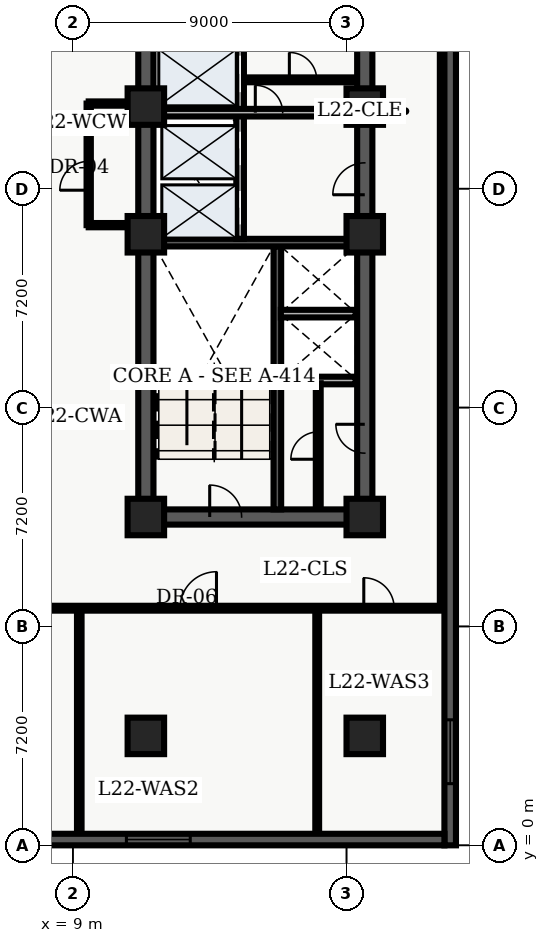
"""IFC4 building model, lengths in metres.
Left out: names, types, materials, properties, quantities, classifications, styles, units other than length and angle.
Written with IfcOpenShell. Run it as: python <this file> out.ifc"""

import sys

from ifc_helpers import new_model, entity, si_unit, converted_unit, direction, frame, origin_with_axes, origin_2d_with_axis, place, context, subcontext, project, spatial, polyline, rectangle, outline, extrude, element, fill, save


model = new_model("IFC4")
c1 = context("Model", 3, precision=1e-05, world=origin_with_axes(), true_north=direction((0.0, 1.0)))
c2 = subcontext(c1, "Body", "Model", "MODEL_VIEW")
j1 = project(units=[si_unit("LENGTHUNIT", "METRE"), converted_unit("PLANEANGLEUNIT", "DEGREE", entity("IfcPlaneAngleMeasure", 0.017), si_unit("PLANEANGLEUNIT", "RADIAN"), dimensions=[0, 0, 0, 0, 0, 0, 0])], contexts=[c1])
p1 = place(None, origin_with_axes())
s1 = spatial("IfcSite", under=j1, at=p1, CompositionType="ELEMENT")
p2 = place(p1, origin_with_axes())
s2 = spatial("IfcBuilding", under=s1, at=p2, CompositionType="ELEMENT")
p3 = place(p2, frame((0.0, 0.0, 93.0), z_axis=(0.0, 0.0, 1.0), x_axis=(1.0, 0.0, 0.0)))
s3 = spatial("IfcBuildingStorey", under=s2, at=p3, CompositionType="ELEMENT", Elevation=93.0)
p4 = place(p3, frame((11.4, 10.8, 0.0), z_axis=(0.0, 0.0, 1.0), x_axis=(0.0, 1.0, 0.0)))
e1 = element("IfcWall", 1, at=p4, inside=s3, PredefinedType="SHEAR", context=c2, shape_type="SweptSolid", body=[
    extrude(outline(polyline([(0.0, -0.25), (27.0, -0.25), (27.0, 0.25), (0.0, 0.25), (0.0, -0.25)])), origin_with_axes(), (0.0, 0.0, 1.0), 3.66),
])
p5 = place(p3, frame((11.4, 10.8, 0.0), z_axis=(0.0, 0.0, 1.0), x_axis=(1.0, 0.0, 0.0)))
e2 = element("IfcWall", 2, at=p5, inside=s3, PredefinedType="SHEAR", context=c2, shape_type="SweptSolid", body=[
    extrude(outline(polyline([(0.0, -0.25), (7.2, -0.25), (7.2, 0.25), (0.0, 0.25), (0.0, -0.25)])), origin_with_axes(), (0.0, 0.0, 1.0), 3.66),
])
p6 = place(p5, frame((2.625, 0.0, 0.0), z_axis=(0.0, 0.0, 1.0), x_axis=(1.0, 0.0, 0.0)))
e3 = element("IfcOpeningElement", 3, at=p6, cuts=e2, PredefinedType="OPENING", context=c2, shape_type="SweptSolid", body=[
    extrude(rectangle(XDim=1.05, YDim=0.52, at=origin_2d_with_axis()), origin_with_axes(), (0.0, 0.0, 1.0), 2.15),
])
p7 = place(p3, frame((18.6, 10.8, 0.0), z_axis=(0.0, 0.0, 1.0), x_axis=(0.0, 1.0, 0.0)))
e4 = element("IfcWall", 4, at=p7, inside=s3, PredefinedType="SHEAR", context=c2, shape_type="SweptSolid", body=[
    extrude(outline(polyline([(0.0, -0.25), (13.5, -0.25), (13.5, 0.25), (0.0, 0.25), (0.0, -0.25)])), origin_with_axes(), (0.0, 0.0, 1.0), 3.66),
])
p8 = place(p7, frame((11.125, 0.0, 0.0), z_axis=(0.0, 0.0, 1.0), x_axis=(1.0, 0.0, 0.0)))
e5 = element("IfcOpeningElement", 5, at=p8, cuts=e4, PredefinedType="OPENING", context=c2, shape_type="SweptSolid", body=[
    extrude(rectangle(XDim=1.05, YDim=0.52, at=origin_2d_with_axis()), origin_with_axes(), (0.0, 0.0, 1.0), 2.15),
])
p9 = place(p7, frame((2.575, 0.0, 0.0), z_axis=(0.0, 0.0, 1.0), x_axis=(1.0, 0.0, 0.0)))
e6 = element("IfcOpeningElement", 6, at=p9, cuts=e4, PredefinedType="OPENING", context=c2, shape_type="SweptSolid", body=[
    extrude(rectangle(XDim=0.95, YDim=0.52, at=origin_2d_with_axis()), origin_with_axes(), (0.0, 0.0, 1.0), 2.15),
])
p10 = place(p3, frame((18.6, 24.3, 0.0), z_axis=(0.0, 0.0, 1.0), x_axis=(0.0, 1.0, 0.0)))
e7 = element("IfcWall", 7, at=p10, inside=s3, PredefinedType="SHEAR", context=c2, shape_type="SweptSolid", body=[
    extrude(outline(polyline([(0.0, -0.25), (13.5, -0.25), (13.5, 0.25), (0.0, 0.25), (0.0, -0.25)])), origin_with_axes(), (0.0, 0.0, 1.0), 3.66),
])
p11 = place(p10, frame((6.025, 0.0, 0.0), z_axis=(0.0, 0.0, 1.0), x_axis=(1.0, 0.0, 0.0)))
e8 = element("IfcOpeningElement", 8, at=p11, cuts=e7, PredefinedType="OPENING", context=c2, shape_type="SweptSolid", body=[
    extrude(rectangle(XDim=0.95, YDim=0.52, at=origin_2d_with_axis()), origin_with_axes(), (0.0, 0.0, 1.0), 2.15),
])
p12 = place(p10, frame((7.825, 0.0, 0.0), z_axis=(0.0, 0.0, 1.0), x_axis=(1.0, 0.0, 0.0)))
e9 = element("IfcOpeningElement", 9, at=p12, cuts=e7, PredefinedType="OPENING", context=c2, shape_type="SweptSolid", body=[
    extrude(rectangle(XDim=0.95, YDim=0.52, at=origin_2d_with_axis()), origin_with_axes(), (0.0, 0.0, 1.0), 2.15),
])
p13 = place(p3, frame((15.725, 11.05, 0.0), z_axis=(0.0, 0.0, 1.0), x_axis=(0.0, 1.0, 0.0)))
e10 = element("IfcWall", 10, at=p13, inside=s3, PredefinedType="SHEAR", context=c2, shape_type="SweptSolid", body=[
    extrude(outline(polyline([(0.0, -0.125), (8.65, -0.125), (8.65, 0.125), (0.0, 0.125), (0.0, -0.125)])), origin_with_axes(), (0.0, 0.0, 1.0), 3.66),
])
p14 = place(p3, frame((11.65, 19.825, 0.0), z_axis=(0.0, 0.0, 1.0), x_axis=(1.0, 0.0, 0.0)))
e11 = element("IfcWall", 11, at=p14, inside=s3, PredefinedType="SHEAR", context=c2, shape_type="SweptSolid", body=[
    extrude(outline(polyline([(0.0, -0.125), (6.7, -0.125), (6.7, 0.125), (0.0, 0.125), (0.0, -0.125)])), origin_with_axes(), (0.0, 0.0, 1.0), 3.66),
])
p15 = place(p3, frame((14.5, 19.95, 0.0), z_axis=(0.0, 0.0, 1.0), x_axis=(0.0, 1.0, 0.0)))
e12 = element("IfcWall", 12, at=p15, inside=s3, PredefinedType="SOLIDWALL", context=c2, shape_type="SweptSolid", body=[
    extrude(outline(polyline([(0.0, -0.125), (6.25, -0.125), (6.25, 0.125), (0.0, 0.125), (0.0, -0.125)])), origin_with_axes(), (0.0, 0.0, 1.0), 2.7),
])
p16 = place(p15, frame((1.025, 0.0, 0.0), z_axis=(0.0, 0.0, 1.0), x_axis=(1.0, 0.0, 0.0)))
e13 = element("IfcOpeningElement", 13, at=p16, cuts=e12, PredefinedType="OPENING", context=c2, shape_type="SweptSolid", body=[
    extrude(rectangle(XDim=1.1, YDim=0.27, at=origin_2d_with_axis()), origin_with_axes(), (0.0, 0.0, 1.0), 2.15),
])
p17 = place(p15, frame((2.975, 0.0, 0.0), z_axis=(0.0, 0.0, 1.0), x_axis=(1.0, 0.0, 0.0)))
e14 = element("IfcOpeningElement", 14, at=p17, cuts=e12, PredefinedType="OPENING", context=c2, shape_type="SweptSolid", body=[
    extrude(rectangle(XDim=1.1, YDim=0.27, at=origin_2d_with_axis()), origin_with_axes(), (0.0, 0.0, 1.0), 2.15),
])
p18 = place(p15, frame((5.425, 0.0, 0.0), z_axis=(0.0, 0.0, 1.0), x_axis=(1.0, 0.0, 0.0)))
e15 = element("IfcOpeningElement", 15, at=p18, cuts=e12, PredefinedType="OPENING", context=c2, shape_type="SweptSolid", body=[
    extrude(rectangle(XDim=1.2, YDim=0.27, at=origin_2d_with_axis()), origin_with_axes(), (0.0, 0.0, 1.0), 2.15),
])
p19 = place(p3, frame((11.7, 24.1, 0.0), z_axis=(0.0, 0.0, 1.0), x_axis=(1.0, 0.0, 0.0)))
e16 = element("IfcWall", 16, at=p19, inside=s3, PredefinedType="SOLIDWALL", context=c2, shape_type="SweptSolid", body=[
    extrude(outline(polyline([(0.0, -0.125), (6.6, -0.125), (6.6, 0.125), (0.0, 0.125), (0.0, -0.125)])), origin_with_axes(), (0.0, 0.0, 1.0), 2.7),
])
p20 = place(p19, frame((3.75, 0.0, 0.0), z_axis=(0.0, 0.0, 1.0), x_axis=(1.0, 0.0, 0.0)))
e17 = element("IfcOpeningElement", 17, at=p20, cuts=e16, PredefinedType="OPENING", context=c2, shape_type="SweptSolid", body=[
    extrude(rectangle(XDim=0.9, YDim=0.27, at=origin_2d_with_axis()), origin_with_axes(), (0.0, 0.0, 1.0), 2.15),
])
for number, where, z_axis, x_axis in (
    (18, (11.4, 3.6, 0.0), (0.0, 0.0, 1.0), (1.0, 0.0, 0.0)),
    (19, (11.4, 10.8, 0.0), (0.0, 0.0, 1.0), (1.0, 0.0, 0.0)),
    (20, (11.4, 20.1, 0.0), (0.0, 0.0, 1.0), (1.0, 0.0, 0.0)),
    (21, (11.4, 24.3, 0.0), (0.0, 0.0, 1.0), (1.0, 0.0, 0.0)),
    (22, (18.6, 3.6, 0.0), (0.0, 0.0, 1.0), (1.0, 0.0, 0.0)),
    (23, (18.6, 10.8, 0.0), (0.0, 0.0, 1.0), (1.0, 0.0, 0.0)),
    (24, (18.6, 20.1, 0.0), (0.0, 0.0, 1.0), (1.0, 0.0, 0.0)),
    (25, (18.6, 24.3, 0.0), (0.0, 0.0, 1.0), (1.0, 0.0, 0.0)),
):
    element("IfcColumn", number, at=place(p3, frame(where, z_axis=z_axis, x_axis=x_axis)), inside=s3, PredefinedType="COLUMN", context=c2, shape_type="SweptSolid", body=[
        extrude(rectangle(XDim=1.2, YDim=1.2, at=origin_2d_with_axis()), origin_with_axes(), (0.0, 0.0, 1.0), 3.9),
    ])
p21 = place(p3, frame((14.62, 25.18, 0.0), z_axis=(0.0, 0.0, 1.0), x_axis=(1.0, 0.0, 0.0)))
e26 = element("IfcWall", 26, at=p21, inside=s3, PredefinedType="PARTITIONING", context=c2, shape_type="SweptSolid", body=[
    extrude(outline(polyline([(0.0, -0.08), (3.68, -0.08), (3.68, 0.08), (0.0, 0.08), (0.0, -0.08)])), origin_with_axes(), (0.0, 0.0, 1.0), 2.7),
])
p22 = place(p21, frame((1.95, 0.0, 0.0), z_axis=(0.0, 0.0, 1.0), x_axis=(1.0, 0.0, 0.0)))
e27 = element("IfcOpeningElement", 27, at=p22, cuts=e26, PredefinedType="OPENING", context=c2, shape_type="SweptSolid", body=[
    extrude(rectangle(XDim=0.9, YDim=0.18, at=origin_2d_with_axis()), origin_with_axes(), (0.0, 0.0, 1.0), 2.15),
])
for number, where, z_axis, x_axis in (
    (28, (15.84, 15.29, 0.0), (0.0, 0.0, 1.0), (1.0, 0.0, 0.0)),
    (29, (15.84, 17.49, 0.0), (0.0, 0.0, 1.0), (1.0, 0.0, 0.0)),
):
    element("IfcWall", number, at=place(p3, frame(where, z_axis=z_axis, x_axis=x_axis)), inside=s3, PredefinedType="SOLIDWALL", context=c2, shape_type="SweptSolid", body=[
        extrude(outline(polyline([(0.0, -0.125), (2.46, -0.125), (2.46, 0.125), (0.0, 0.125), (0.0, -0.125)])), origin_with_axes(), (0.0, 0.0, 1.0), 2.7),
    ])
p23 = place(p3, frame((17.07, 11.1, 0.0), z_axis=(0.0, 0.0, 1.0), x_axis=(0.0, 1.0, 0.0)))
e30 = element("IfcWall", 30, at=p23, inside=s3, PredefinedType="PARTITIONING", context=c2, shape_type="SweptSolid", body=[
    extrude(outline(polyline([(0.0, -0.08), (4.1, -0.08), (4.1, 0.08), (0.0, 0.08), (0.0, -0.08)])), origin_with_axes(), (0.0, 0.0, 1.0), 2.7),
])
p24 = place(p23, frame((2.05, 0.0, 0.0), z_axis=(0.0, 0.0, 1.0), x_axis=(1.0, 0.0, 0.0)))
e31 = element("IfcOpeningElement", 31, at=p24, cuts=e30, PredefinedType="OPENING", context=c2, shape_type="SweptSolid", body=[
    extrude(rectangle(XDim=0.9, YDim=0.18, at=origin_2d_with_axis()), origin_with_axes(), (0.0, 0.0, 1.0), 2.15),
])
p25 = place(p3, frame((9.52, 20.4, 0.0), z_axis=(0.0, 0.0, 1.0), x_axis=(0.0, 1.0, 0.0)))
e32 = element("IfcWall", 32, at=p25, inside=s3, PredefinedType="PARTITIONING", context=c2, shape_type="SweptSolid", body=[
    extrude(outline(polyline([(0.0, -0.07), (4.0, -0.07), (4.0, 0.07), (0.0, 0.07), (0.0, -0.07)])), origin_with_axes(), (0.0, 0.0, 1.0), 2.7),
])
p26 = place(p25, frame((1.625, 0.0, 0.0), z_axis=(0.0, 0.0, 1.0), x_axis=(1.0, 0.0, 0.0)))
e33 = element("IfcOpeningElement", 33, at=p26, cuts=e32, PredefinedType="OPENING", context=c2, shape_type="SweptSolid", body=[
    extrude(rectangle(XDim=0.95, YDim=0.16, at=origin_2d_with_axis()), origin_with_axes(), (0.0, 0.0, 1.0), 2.15),
])
for number, where, z_axis, x_axis in (
    (34, (9.52, 20.4, 0.0), (0.0, 0.0, 1.0), (1.0, 0.0, 0.0)),
    (35, (9.52, 24.4, 0.0), (0.0, 0.0, 1.0), (1.0, 0.0, 0.0)),
):
    element("IfcWall", number, at=place(p3, frame(where, z_axis=z_axis, x_axis=x_axis)), inside=s3, PredefinedType="PARTITIONING", context=c2, shape_type="SweptSolid", body=[
        extrude(outline(polyline([(0.0, -0.07), (1.58, -0.07), (1.58, 0.07), (0.0, 0.07), (0.0, -0.07)])), origin_with_axes(), (0.0, 0.0, 1.0), 2.7),
    ])
p27 = place(p3, frame((2.6, 7.8, 0.0), z_axis=(0.0, 0.0, 1.0), x_axis=(1.0, 0.0, 0.0)))
e36 = element("IfcWall", 36, at=p27, inside=s3, PredefinedType="PARTITIONING", context=c2, shape_type="SweptSolid", body=[
    extrude(outline(polyline([(0.0, -0.08), (18.625, -0.08), (18.625, 0.08), (0.0, 0.08), (0.0, -0.08)])), origin_with_axes(), (0.0, 0.0, 1.0), 2.7),
])
p28 = place(p27, frame((2.42, 0.0, 0.0), z_axis=(0.0, 0.0, 1.0), x_axis=(1.0, 0.0, 0.0)))
e37 = element("IfcOpeningElement", 37, at=p28, cuts=e36, PredefinedType="OPENING", context=c2, shape_type="SweptSolid", body=[
    extrude(rectangle(XDim=1.0, YDim=0.18, at=origin_2d_with_axis()), origin_with_axes(), (0.0, 0.0, 1.0), 2.15),
])
p29 = place(p27, frame((10.523, 0.0, 0.0), z_axis=(0.0, 0.0, 1.0), x_axis=(1.0, 0.0, 0.0)))
e38 = element("IfcOpeningElement", 38, at=p29, cuts=e36, PredefinedType="OPENING", context=c2, shape_type="SweptSolid", body=[
    extrude(rectangle(XDim=1.2, YDim=0.18, at=origin_2d_with_axis()), origin_with_axes(), (0.0, 0.0, 1.0), 2.2),
])
p30 = place(p27, frame((16.468, 0.0, 0.0), z_axis=(0.0, 0.0, 1.0), x_axis=(1.0, 0.0, 0.0)))
e39 = element("IfcOpeningElement", 39, at=p30, cuts=e36, PredefinedType="OPENING", context=c2, shape_type="SweptSolid", body=[
    extrude(rectangle(XDim=1.0, YDim=0.18, at=origin_2d_with_axis()), origin_with_axes(), (0.0, 0.0, 1.0), 2.15),
])
p31 = place(p3, frame((21.15, 7.8, 0.0), z_axis=(0.0, 0.0, 1.0), x_axis=(0.0, 1.0, 0.0)))
e40 = element("IfcWall", 40, at=p31, inside=s3, PredefinedType="PARTITIONING", context=c2, shape_type="SweptSolid", body=[
    extrude(outline(polyline([(0.0, -0.08), (32.7, -0.08), (32.7, 0.08), (0.0, 0.08), (0.0, -0.08)])), origin_with_axes(), (0.0, 0.0, 1.0), 2.7),
])
p32 = place(p3, frame((9.21, 0.36, 0.0), z_axis=(0.0, 0.0, 1.0), x_axis=(0.0, 1.0, 0.0)))
e41 = element("IfcWall", 41, at=p32, inside=s3, PredefinedType="PARTITIONING", context=c2, shape_type="SweptSolid", body=[
    extrude(outline(polyline([(0.0, -0.075), (7.34, -0.075), (7.34, 0.075), (0.0, 0.075), (0.0, -0.075)])), origin_with_axes(), (0.0, 0.0, 1.0), 2.7),
])
p33 = place(p3, frame((17.036, 0.36, 0.0), z_axis=(0.0, 0.0, 1.0), x_axis=(0.0, 1.0, 0.0)))
e42 = element("IfcWall", 42, at=p33, inside=s3, PredefinedType="PARTITIONING", context=c2, shape_type="SweptSolid", body=[
    extrude(outline(polyline([(0.0, -0.062), (7.34, -0.062), (7.34, 0.062), (0.0, 0.062), (0.0, -0.062)])), origin_with_axes(), (0.0, 0.0, 1.0), 2.7),
])
p34 = place(p3, frame((21.41, 45.82, 0.0), z_axis=(0.0, 0.0, 1.0), x_axis=(0.0, -1.0, 0.0)))
e43 = element("IfcWall", 43, at=p34, inside=s3, PredefinedType="SOLIDWALL", context=c2, shape_type="SweptSolid", body=[
    extrude(outline(polyline([(0.0, -0.19), (45.82, -0.19), (45.82, 0.19), (0.0, 0.19), (0.0, -0.19)])), origin_with_axes(), (0.0, 0.0, 1.0), 3.66),
])
p35 = place(p34, frame((3.079, 0.0, 0.45), z_axis=(0.0, 0.0, 1.0), x_axis=(1.0, 0.0, 0.0)))
e44 = element("IfcOpeningElement", 44, at=p35, cuts=e43, PredefinedType="OPENING", context=c2, shape_type="SweptSolid", body=[
    extrude(rectangle(XDim=2.1, YDim=0.4, at=origin_2d_with_axis()), origin_with_axes(), (0.0, 0.0, 1.0), 2.2),
])
p36 = place(p34, frame((42.741, 0.0, 0.45), z_axis=(0.0, 0.0, 1.0), x_axis=(1.0, 0.0, 0.0)))
e45 = element("IfcOpeningElement", 45, at=p36, cuts=e43, PredefinedType="OPENING", context=c2, shape_type="SweptSolid", body=[
    extrude(rectangle(XDim=2.1, YDim=0.4, at=origin_2d_with_axis()), origin_with_axes(), (0.0, 0.0, 1.0), 2.2),
])
p37 = place(p3, frame((21.22, 0.19, 0.0), z_axis=(0.0, 0.0, 1.0), x_axis=(-1.0, 0.0, 0.0)))
e46 = element("IfcWall", 46, at=p37, inside=s3, PredefinedType="SOLIDWALL", context=c2, shape_type="SweptSolid", body=[
    extrude(outline(polyline([(0.0, -0.19), (18.82, -0.19), (18.82, 0.19), (0.0, 0.19), (0.0, -0.19)])), origin_with_axes(), (0.0, 0.0, 1.0), 3.66),
])
p38 = place(p37, frame((9.41, 0.0, 0.45), z_axis=(0.0, 0.0, 1.0), x_axis=(1.0, 0.0, 0.0)))
e47 = element("IfcOpeningElement", 47, at=p38, cuts=e46, PredefinedType="OPENING", context=c2, shape_type="SweptSolid", body=[
    extrude(rectangle(XDim=2.1, YDim=0.4, at=origin_2d_with_axis()), origin_with_axes(), (0.0, 0.0, 1.0), 2.2),
])
p39 = place(p37, frame((15.283, 0.0, 0.45), z_axis=(0.0, 0.0, 1.0), x_axis=(1.0, 0.0, 0.0)))
e48 = element("IfcOpeningElement", 48, at=p39, cuts=e46, PredefinedType="OPENING", context=c2, shape_type="SweptSolid", body=[
    extrude(rectangle(XDim=2.1, YDim=0.4, at=origin_2d_with_axis()), origin_with_axes(), (0.0, 0.0, 1.0), 2.2),
])
p40 = place(p15, frame((1.025, 0.0, 0.0), z_axis=(0.0, 0.0, 1.0), x_axis=(1.0, 0.0, 0.0)))
e49 = element("IfcDoor", 49, at=p40, inside=s3, OperationType="SLIDING_TO_LEFT", PredefinedType="DOOR", context=c2, shape_type="SweptSolid", body=[
    extrude(rectangle(XDim=1.1, YDim=0.09, at=origin_2d_with_axis()), origin_with_axes(), (0.0, 0.0, 1.0), 2.15),
])
fill(e13, e49)
p41 = place(p15, frame((2.975, 0.0, 0.0), z_axis=(0.0, 0.0, 1.0), x_axis=(1.0, 0.0, 0.0)))
e50 = element("IfcDoor", 50, at=p41, inside=s3, OperationType="SLIDING_TO_RIGHT", PredefinedType="DOOR", context=c2, shape_type="SweptSolid", body=[
    extrude(rectangle(XDim=1.1, YDim=0.09, at=origin_2d_with_axis()), origin_with_axes(), (0.0, 0.0, 1.0), 2.15),
])
fill(e14, e50)
p42 = place(p15, frame((5.425, 0.0, 0.0), z_axis=(0.0, 0.0, 1.0), x_axis=(1.0, 0.0, 0.0)))
e51 = element("IfcDoor", 51, at=p42, inside=s3, OperationType="DOUBLE_DOOR_SLIDING", PredefinedType="DOOR", context=c2, shape_type="SweptSolid", body=[
    extrude(rectangle(XDim=1.2, YDim=0.09, at=origin_2d_with_axis()), origin_with_axes(), (0.0, 0.0, 1.0), 2.15),
])
fill(e15, e51)
p43 = place(p5, frame((2.625, 0.0, 0.0), z_axis=(0.0, 0.0, 1.0), x_axis=(1.0, 0.0, 0.0)))
e52 = element("IfcDoor", 52, at=p43, inside=s3, OperationType="SINGLE_SWING_LEFT", PredefinedType="DOOR", context=c2, shape_type="SweptSolid", body=[
    extrude(rectangle(XDim=1.05, YDim=0.09, at=origin_2d_with_axis()), origin_with_axes(), (0.0, 0.0, 1.0), 2.15),
])
fill(e3, e52)
p44 = place(p7, frame((11.125, 0.0, 0.0), z_axis=(0.0, 0.0, 1.0), x_axis=(1.0, 0.0, 0.0)))
e53 = element("IfcDoor", 53, at=p44, inside=s3, OperationType="SINGLE_SWING_LEFT", PredefinedType="DOOR", context=c2, shape_type="SweptSolid", body=[
    extrude(rectangle(XDim=1.05, YDim=0.09, at=origin_2d_with_axis()), origin_with_axes(), (0.0, 0.0, 1.0), 2.15),
])
fill(e5, e53)
p45 = place(p19, frame((3.75, 0.0, 0.0), z_axis=(0.0, 0.0, 1.0), x_axis=(1.0, 0.0, 0.0)))
e54 = element("IfcDoor", 54, at=p45, inside=s3, OperationType="SINGLE_SWING_LEFT", PredefinedType="DOOR", context=c2, shape_type="SweptSolid", body=[
    extrude(rectangle(XDim=0.9, YDim=0.09, at=origin_2d_with_axis()), origin_with_axes(), (0.0, 0.0, 1.0), 2.15),
])
fill(e17, e54)
p46 = place(p21, frame((1.95, 0.0, 0.0), z_axis=(0.0, 0.0, 1.0), x_axis=(1.0, 0.0, 0.0)))
e55 = element("IfcDoor", 55, at=p46, inside=s3, OperationType="SINGLE_SWING_LEFT", PredefinedType="DOOR", context=c2, shape_type="SweptSolid", body=[
    extrude(rectangle(XDim=0.9, YDim=0.09, at=origin_2d_with_axis()), origin_with_axes(), (0.0, 0.0, 1.0), 2.15),
])
fill(e27, e55)
p47 = place(p23, frame((2.05, 0.0, 0.0), z_axis=(0.0, 0.0, 1.0), x_axis=(1.0, 0.0, 0.0)))
e56 = element("IfcDoor", 56, at=p47, inside=s3, OperationType="SINGLE_SWING_LEFT", PredefinedType="DOOR", context=c2, shape_type="SweptSolid", body=[
    extrude(rectangle(XDim=0.9, YDim=0.09, at=origin_2d_with_axis()), origin_with_axes(), (0.0, 0.0, 1.0), 2.15),
])
fill(e31, e56)
p48 = place(p7, frame((2.575, 0.0, 0.0), z_axis=(0.0, 0.0, 1.0), x_axis=(1.0, 0.0, 0.0)))
e57 = element("IfcDoor", 57, at=p48, inside=s3, OperationType="SINGLE_SWING_RIGHT", PredefinedType="DOOR", context=c2, shape_type="SweptSolid", body=[
    extrude(rectangle(XDim=0.95, YDim=0.09, at=origin_2d_with_axis()), origin_with_axes(), (0.0, 0.0, 1.0), 2.15),
])
fill(e6, e57)
p49 = place(p25, frame((1.625, 0.0, 0.0), z_axis=(0.0, 0.0, 1.0), x_axis=(1.0, 0.0, 0.0)))
e58 = element("IfcDoor", 58, at=p49, inside=s3, OperationType="SINGLE_SWING_LEFT", PredefinedType="DOOR", context=c2, shape_type="SweptSolid", body=[
    extrude(rectangle(XDim=0.95, YDim=0.084, at=origin_2d_with_axis()), origin_with_axes(), (0.0, 0.0, 1.0), 2.15),
])
fill(e33, e58)
p50 = place(p27, frame((10.523, 0.0, 0.0), z_axis=(0.0, 0.0, 1.0), x_axis=(1.0, 0.0, 0.0)))
e59 = element("IfcDoor", 59, at=p50, inside=s3, OperationType="SINGLE_SWING_RIGHT", PredefinedType="DOOR", context=c2, shape_type="SweptSolid", body=[
    extrude(rectangle(XDim=1.2, YDim=0.09, at=origin_2d_with_axis()), origin_with_axes(), (0.0, 0.0, 1.0), 2.2),
])
fill(e38, e59)
p51 = place(p27, frame((16.468, 0.0, 0.0), z_axis=(0.0, 0.0, 1.0), x_axis=(1.0, 0.0, 0.0)))
e60 = element("IfcDoor", 60, at=p51, inside=s3, OperationType="SINGLE_SWING_LEFT", PredefinedType="DOOR", context=c2, shape_type="SweptSolid", body=[
    extrude(rectangle(XDim=1.0, YDim=0.09, at=origin_2d_with_axis()), origin_with_axes(), (0.0, 0.0, 1.0), 2.15),
])
fill(e39, e60)
p52 = place(p34, frame((42.741, 0.0, 0.45), z_axis=(0.0, 0.0, 1.0), x_axis=(1.0, 0.0, 0.0)))
e61 = element("IfcWindow", 61, at=p52, inside=s3, PredefinedType="WINDOW", context=c2, shape_type="SweptSolid", body=[
    extrude(rectangle(XDim=2.1, YDim=0.09, at=origin_2d_with_axis()), origin_with_axes(), (0.0, 0.0, 1.0), 2.2),
])
fill(e45, e61)
p53 = place(p37, frame((9.41, 0.0, 0.45), z_axis=(0.0, 0.0, 1.0), x_axis=(1.0, 0.0, 0.0)))
e62 = element("IfcWindow", 62, at=p53, inside=s3, PredefinedType="WINDOW", context=c2, shape_type="SweptSolid", body=[
    extrude(rectangle(XDim=2.1, YDim=0.09, at=origin_2d_with_axis()), origin_with_axes(), (0.0, 0.0, 1.0), 2.2),
])
fill(e47, e62)
save(model, sys.argv[1])
